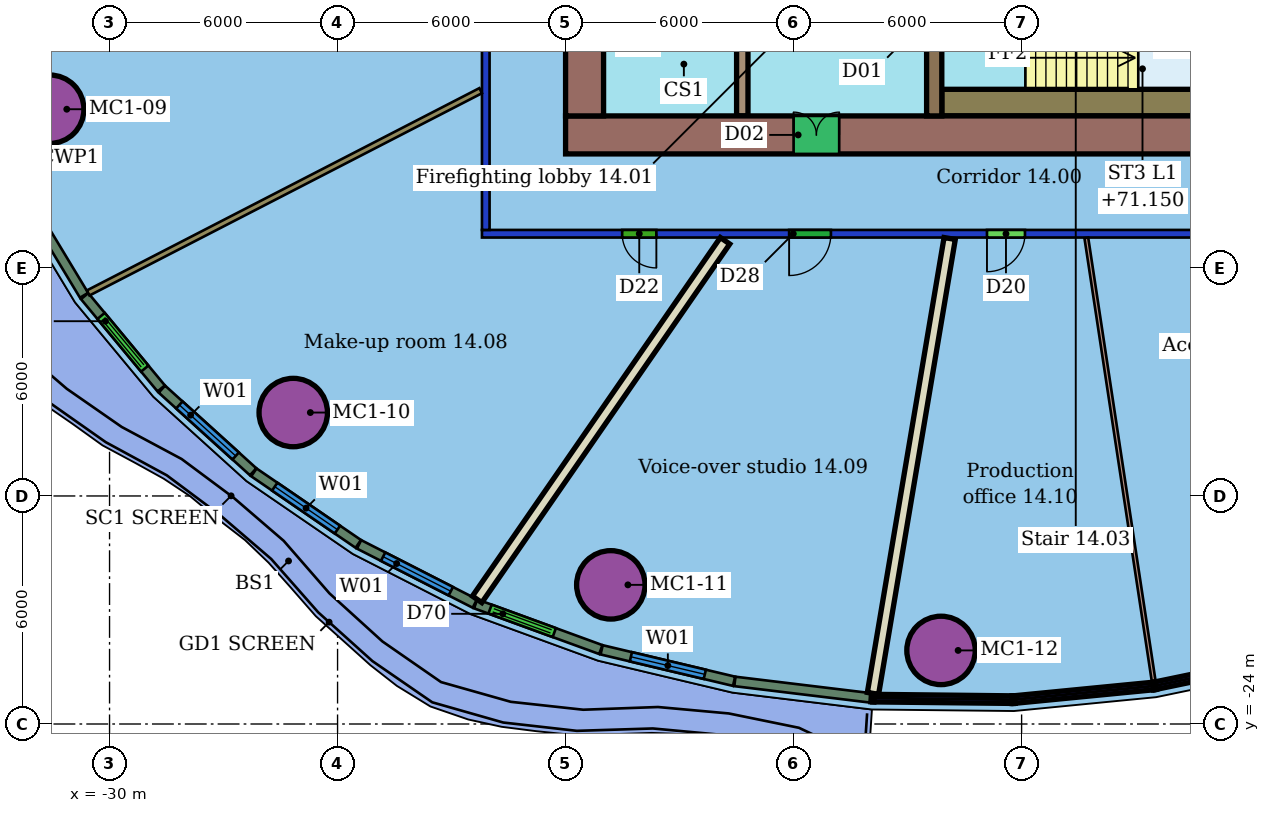
"""IFC4 building model, lengths in metres.
Left out: names, types, materials, properties, quantities, classifications, styles, units other than length and angle.
Written with IfcOpenShell. Run it as: python <this file> out.ifc"""

import sys

from ifc_helpers import new_model, si_unit, direction, frame, frame_2d, origin, origin_2d, place, context, subcontext, project, spatial, rectangle, hollow_circle, extrude, element, fill, save


model = new_model("IFC4")
c1 = context("Model", 3, precision=1e-05, world=origin(), true_north=direction((0.0, 1.0)))
c2 = subcontext(c1, "Body", "Model", "MODEL_VIEW")
j1 = project(units=[si_unit("LENGTHUNIT", "METRE"), si_unit("PLANEANGLEUNIT", "RADIAN")], contexts=[c1])
p1 = place(None, origin())
s1 = spatial("IfcSite", under=j1, at=p1, CompositionType="ELEMENT")
p2 = place(p1, origin())
s2 = spatial("IfcBuilding", under=s1, at=p2, CompositionType="ELEMENT")
p3 = place(p2, frame((0.0, 0.0, 69.3)))
s3 = spatial("IfcBuildingStorey", under=s2, at=p3, CompositionType="ELEMENT", Elevation=69.3)
for number, where, z_axis, x_axis in (
    (1, (-31.575, -7.824, 0.0), (0.0, 0.0, 1.0), (1.0, 0.0, 0.0)),
    (2, (-25.166, -15.805, 0.0), (0.0, 0.0, 1.0), (1.0, 0.0, 0.0)),
    (3, (-16.81, -20.339, 0.0), (0.0, 0.0, 1.0), (1.0, 0.0, 0.0)),
    (4, (-8.121, -22.064, 0.0), (0.0, 0.0, 1.0), (1.0, 0.0, 0.0)),
):
    element("IfcColumn", number, at=place(p3, frame(where, z_axis=z_axis, x_axis=x_axis)), inside=s3, PredefinedType="COLUMN", context=c2, shape_type="SweptSolid", body=[
        extrude(hollow_circle(Radius=0.9, WallThickness=0.06, at=origin_2d()), origin(), (0.0, 0.0, 1.0), 3.55),
    ])
p4 = place(p3, frame((8.2, -11.1, 0.0), z_axis=(0.0, 0.0, 1.0), x_axis=(-1.0, 0.0, 0.0)))
e5 = element("IfcWall", 5, at=p4, inside=s3, PredefinedType="PARTITIONING", context=c2, shape_type="SweptSolid", body=[
    extrude(rectangle(XDim=28.4, YDim=0.2, at=frame_2d((14.2, 0.0))), origin(), (0.0, 0.0, 1.0), 2.85),
])
p5 = place(p4, frame((23.811, 0.0, 0.0)))
e6 = element("IfcOpeningElement", 6, at=p5, cuts=e5, PredefinedType="OPENING", context=c2, shape_type="SweptSolid", body=[
    extrude(rectangle(XDim=0.9, YDim=2.1, at=frame_2d((0.45, 1.05))), frame((0.0, 0.11, 0.0), z_axis=(0.0, -1.0, 0.0), x_axis=(1.0, 0.0, 0.0)), (0.0, 0.0, 1.0), 0.22),
])
p6 = place(p4, frame((19.218, 0.0, 0.0)))
e7 = element("IfcOpeningElement", 7, at=p6, cuts=e5, PredefinedType="OPENING", context=c2, shape_type="SweptSolid", body=[
    extrude(rectangle(XDim=1.1, YDim=2.1, at=frame_2d((0.55, 1.05))), frame((0.0, 0.11, 0.0), z_axis=(0.0, -1.0, 0.0), x_axis=(1.0, 0.0, 0.0)), (0.0, 0.0, 1.0), 0.22),
])
p7 = place(p4, frame((14.111, 0.0, 0.0)))
e8 = element("IfcOpeningElement", 8, at=p7, cuts=e5, PredefinedType="OPENING", context=c2, shape_type="SweptSolid", body=[
    extrude(rectangle(XDim=1.0, YDim=2.1, at=frame_2d((0.5, 1.05))), frame((0.0, 0.11, 0.0), z_axis=(0.0, -1.0, 0.0), x_axis=(1.0, 0.0, 0.0)), (0.0, 0.0, 1.0), 0.22),
])
p8 = place(p4, frame((7.977, 0.0, 0.0)))
e9 = element("IfcOpeningElement", 9, at=p8, cuts=e5, PredefinedType="OPENING", context=c2, shape_type="SweptSolid", body=[
    extrude(rectangle(XDim=1.0, YDim=2.1, at=frame_2d((0.5, 1.05))), frame((0.0, 0.11, 0.0), z_axis=(0.0, -1.0, 0.0), x_axis=(1.0, 0.0, 0.0)), (0.0, 0.0, 1.0), 0.22),
])
p9 = place(p4, frame((3.287, 0.0, 0.0)))
e10 = element("IfcOpeningElement", 10, at=p9, cuts=e5, PredefinedType="OPENING", context=c2, shape_type="SweptSolid", body=[
    extrude(rectangle(XDim=1.2, YDim=2.1, at=frame_2d((0.6, 1.05))), frame((0.0, 0.11, 0.0), z_axis=(0.0, -1.0, 0.0), x_axis=(1.0, 0.0, 0.0)), (0.0, 0.0, 1.0), 0.22),
])
p10 = place(p3, frame((-20.1, -11.0, 0.0), z_axis=(0.0, 0.0, 1.0), x_axis=(0.0, 1.0, 0.0)))
e11 = element("IfcWall", 11, at=p10, inside=s3, PredefinedType="PARTITIONING", context=c2, shape_type="SweptSolid", body=[
    extrude(rectangle(XDim=22.0, YDim=0.2, at=frame_2d((11.0, 0.0))), origin(), (0.0, 0.0, 1.0), 2.85),
])
p11 = place(p10, frame((18.55, 0.0, 0.0)))
e12 = element("IfcOpeningElement", 12, at=p11, cuts=e11, PredefinedType="OPENING", context=c2, shape_type="SweptSolid", body=[
    extrude(rectangle(XDim=1.0, YDim=2.1, at=frame_2d((0.5, 1.05))), frame((0.0, 0.11, 0.0), z_axis=(0.0, -1.0, 0.0), x_axis=(1.0, 0.0, 0.0)), (0.0, 0.0, 1.0), 0.22),
])
p12 = place(p10, frame((14.132, 0.0, 0.0)))
e13 = element("IfcOpeningElement", 13, at=p12, cuts=e11, PredefinedType="OPENING", context=c2, shape_type="SweptSolid", body=[
    extrude(rectangle(XDim=1.1, YDim=2.1, at=frame_2d((0.55, 1.05))), frame((0.0, 0.11, 0.0), z_axis=(0.0, -1.0, 0.0), x_axis=(1.0, 0.0, 0.0)), (0.0, 0.0, 1.0), 0.22),
])
p13 = place(p10, frame((5.589, 0.0, 0.0)))
e14 = element("IfcOpeningElement", 14, at=p13, cuts=e11, PredefinedType="OPENING", context=c2, shape_type="SweptSolid", body=[
    extrude(rectangle(XDim=1.0, YDim=2.1, at=frame_2d((0.5, 1.05))), frame((0.0, 0.11, 0.0), z_axis=(0.0, -1.0, 0.0), x_axis=(1.0, 0.0, 0.0)), (0.0, 0.0, 1.0), 0.22),
])
p14 = place(p3, frame((-30.562, -12.658, 0.0), z_axis=(0.0, 0.0, 1.0), x_axis=(0.888901442765, 0.458098488375, 0.0)))
e15 = element("IfcWall", 15, at=p14, inside=s3, PredefinedType="PARTITIONING", context=c2, shape_type="SweptSolid", body=[
    extrude(rectangle(XDim=11.619, YDim=0.15, at=frame_2d((5.809, 0.0))), origin(), (0.0, 0.0, 1.0), 3.55),
])
p15 = place(p3, frame((-20.327, -20.72, 0.0), z_axis=(0.0, 0.0, 1.0), x_axis=(0.568736200027, 0.822519990504, 0.0)))
e16 = element("IfcWall", 16, at=p15, inside=s3, PredefinedType="PARTITIONING", context=c2, shape_type="SweptSolid", body=[
    extrude(rectangle(XDim=11.471, YDim=0.3, at=frame_2d((5.735, 0.0))), origin(), (0.0, 0.0, 1.0), 3.55),
])
p16 = place(p3, frame((-9.911, -23.194, 0.0), z_axis=(0.0, 0.0, 1.0), x_axis=(0.16625453359, 0.986082871802, 0.0)))
e17 = element("IfcWall", 17, at=p16, inside=s3, PredefinedType="PARTITIONING", context=c2, shape_type="SweptSolid", body=[
    extrude(rectangle(XDim=12.138, YDim=0.3, at=frame_2d((6.069, 0.0))), origin(), (0.0, 0.0, 1.0), 3.55),
])
p17 = place(p3, frame((-2.524, -22.874, 0.0), z_axis=(0.0, 0.0, 1.0), x_axis=(-0.150244181416, 0.988648919461, 0.0)))
e18 = element("IfcWall", 18, at=p17, inside=s3, PredefinedType="PARTITIONING", context=c2, shape_type="SweptSolid", body=[
    extrude(rectangle(XDim=11.801, YDim=0.1, at=frame_2d((5.9, 0.0))), origin(), (0.0, 0.0, 1.0), 3.55),
])
p18 = place(p3, frame((-32.246, -10.113, 0.0), z_axis=(0.0, 0.0, 1.0), x_axis=(0.517204963357, -0.855861569343, 0.0)))
e19 = element("IfcWall", 19, at=p18, inside=s3, PredefinedType="SOLIDWALL", context=c2, shape_type="SweptSolid", body=[
    extrude(rectangle(XDim=3.045, YDim=0.25, at=frame_2d((1.522, 0.0))), origin(), (0.0, 0.0, 1.0), 3.15),
])
p19 = place(p3, frame((-30.656, -12.741, 0.0), z_axis=(0.0, 0.0, 1.0), x_axis=(0.638501311246, -0.769620734867, 0.0)))
e20 = element("IfcWall", 20, at=p19, inside=s3, PredefinedType="SOLIDWALL", context=c2, shape_type="SweptSolid", body=[
    extrude(rectangle(XDim=3.156, YDim=0.25, at=frame_2d((1.578, 0.0))), origin(), (0.0, 0.0, 1.0), 3.15),
])
p20 = place(p19, frame((0.678, 0.0, 0.0)))
e21 = element("IfcOpeningElement", 21, at=p20, cuts=e20, PredefinedType="OPENING", context=c2, shape_type="SweptSolid", body=[
    extrude(rectangle(XDim=1.8, YDim=2.4, at=frame_2d((0.9, 1.2))), frame((0.0, 0.135, 0.0), z_axis=(0.0, -1.0, 0.0), x_axis=(1.0, 0.0, 0.0)), (0.0, 0.0, 1.0), 0.27),
])
p21 = place(p3, frame((-28.623, -15.189, 0.0), z_axis=(0.0, 0.0, 1.0), x_axis=(0.741210741085, -0.671272401712, 0.0)))
e22 = element("IfcWall", 22, at=p21, inside=s3, PredefinedType="SOLIDWALL", context=c2, shape_type="SweptSolid", body=[
    extrude(rectangle(XDim=3.24, YDim=0.25, at=frame_2d((1.62, 0.0))), origin(), (0.0, 0.0, 1.0), 3.15),
])
p22 = place(p21, frame((0.62, 0.0, 0.8)))
e23 = element("IfcOpeningElement", 23, at=p22, cuts=e22, PredefinedType="OPENING", context=c2, shape_type="SweptSolid", body=[
    extrude(rectangle(XDim=2.0, YDim=2.2, at=frame_2d((1.0, 1.1))), frame((0.0, 0.135, 0.0), z_axis=(0.0, -1.0, 0.0), x_axis=(1.0, 0.0, 0.0)), (0.0, 0.0, 1.0), 0.27),
])
p23 = place(p3, frame((-26.202, -17.379, 0.0), z_axis=(0.0, 0.0, 1.0), x_axis=(0.824956428259, -0.565196330026, 0.0)))
e24 = element("IfcWall", 24, at=p23, inside=s3, PredefinedType="SOLIDWALL", context=c2, shape_type="SweptSolid", body=[
    extrude(rectangle(XDim=3.33, YDim=0.25, at=frame_2d((1.665, 0.0))), origin(), (0.0, 0.0, 1.0), 3.15),
])
p24 = place(p23, frame((0.665, 0.0, 0.8)))
e25 = element("IfcOpeningElement", 25, at=p24, cuts=e24, PredefinedType="OPENING", context=c2, shape_type="SweptSolid", body=[
    extrude(rectangle(XDim=2.0, YDim=2.2, at=frame_2d((1.0, 1.1))), frame((0.0, 0.135, 0.0), z_axis=(0.0, -1.0, 0.0), x_axis=(1.0, 0.0, 0.0)), (0.0, 0.0, 1.0), 0.27),
])
p25 = place(p3, frame((-23.434, -19.273, 0.0), z_axis=(0.0, 0.0, 1.0), x_axis=(0.890540062844, -0.454904821331, 0.0)))
e26 = element("IfcWall", 26, at=p25, inside=s3, PredefinedType="SOLIDWALL", context=c2, shape_type="SweptSolid", body=[
    extrude(rectangle(XDim=3.421, YDim=0.25, at=frame_2d((1.71, 0.0))), origin(), (0.0, 0.0, 1.0), 3.15),
])
p26 = place(p25, frame((0.71, 0.0, 0.8)))
e27 = element("IfcOpeningElement", 27, at=p26, cuts=e26, PredefinedType="OPENING", context=c2, shape_type="SweptSolid", body=[
    extrude(rectangle(XDim=2.0, YDim=2.2, at=frame_2d((1.0, 1.1))), frame((0.0, 0.135, 0.0), z_axis=(0.0, -1.0, 0.0), x_axis=(1.0, 0.0, 0.0)), (0.0, 0.0, 1.0), 0.27),
])
p27 = place(p3, frame((-20.366, -20.839, 0.0), z_axis=(0.0, 0.0, 1.0), x_axis=(0.939349487408, -0.34296142714, 0.0)))
e28 = element("IfcWall", 28, at=p27, inside=s3, PredefinedType="SOLIDWALL", context=c2, shape_type="SweptSolid", body=[
    extrude(rectangle(XDim=3.507, YDim=0.25, at=frame_2d((1.753, 0.0))), origin(), (0.0, 0.0, 1.0), 3.15),
])
p28 = place(p27, frame((0.403, 0.0, 0.0)))
e29 = element("IfcOpeningElement", 29, at=p28, cuts=e28, PredefinedType="OPENING", context=c2, shape_type="SweptSolid", body=[
    extrude(rectangle(XDim=1.8, YDim=2.4, at=frame_2d((0.9, 1.2))), frame((0.0, 0.135, 0.0), z_axis=(0.0, -1.0, 0.0), x_axis=(1.0, 0.0, 0.0)), (0.0, 0.0, 1.0), 0.27),
])
p29 = place(p3, frame((-17.051, -22.048, 0.0), z_axis=(0.0, 0.0, 1.0), x_axis=(0.972918732783, -0.231147440823, 0.0)))
e30 = element("IfcWall", 30, at=p29, inside=s3, PredefinedType="SOLIDWALL", context=c2, shape_type="SweptSolid", body=[
    extrude(rectangle(XDim=3.582, YDim=0.25, at=frame_2d((1.791, 0.0))), origin(), (0.0, 0.0, 1.0), 3.15),
])
p30 = place(p29, frame((0.791, 0.0, 0.8)))
e31 = element("IfcOpeningElement", 31, at=p30, cuts=e30, PredefinedType="OPENING", context=c2, shape_type="SweptSolid", body=[
    extrude(rectangle(XDim=2.0, YDim=2.2, at=frame_2d((1.0, 1.1))), frame((0.0, 0.135, 0.0), z_axis=(0.0, -1.0, 0.0), x_axis=(1.0, 0.0, 0.0)), (0.0, 0.0, 1.0), 0.27),
])
p31 = place(p3, frame((-13.545, -22.88, 0.0), z_axis=(0.0, 0.0, 1.0), x_axis=(0.992750723447, -0.120191518405, 0.0)))
e32 = element("IfcWall", 32, at=p31, inside=s3, PredefinedType="SOLIDWALL", context=c2, shape_type="SweptSolid", body=[
    extrude(rectangle(XDim=3.597, YDim=0.25, at=frame_2d((1.799, 0.0))), origin(), (0.0, 0.0, 1.0), 3.15),
])
p32 = place(p3, frame((-18.0, -8.5, 0.0), z_axis=(0.0, 0.0, 1.0), x_axis=(1.0, 0.0, 0.0)))
e33 = element("IfcWall", 33, at=p32, inside=s3, PredefinedType="SHEAR", context=c2, shape_type="SweptSolid", body=[
    extrude(rectangle(XDim=24.0, YDim=1.0, at=frame_2d((12.0, 0.0))), origin(), (0.0, 0.0, 1.0), 3.4),
])
p33 = place(p32, frame((6.0, 0.0, 0.0)))
e34 = element("IfcOpeningElement", 34, at=p33, cuts=e33, PredefinedType="OPENING", context=c2, shape_type="SweptSolid", body=[
    extrude(rectangle(XDim=1.2, YDim=2.1, at=frame_2d((0.6, 1.05))), frame((0.0, 0.51, 0.0), z_axis=(0.0, -1.0, 0.0), x_axis=(1.0, 0.0, 0.0)), (0.0, 0.0, 1.0), 1.02),
])
p34 = place(p3, frame((-17.5, 8.0, 0.0), z_axis=(0.0, 0.0, 1.0), x_axis=(0.0, -1.0, 0.0)))
e35 = element("IfcWall", 35, at=p34, inside=s3, PredefinedType="SHEAR", context=c2, shape_type="SweptSolid", body=[
    extrude(rectangle(XDim=16.0, YDim=1.0, at=frame_2d((8.0, 0.0))), origin(), (0.0, 0.0, 1.0), 3.4),
])
p35 = place(p34, frame((11.9, 0.0, 0.0)))
e36 = element("IfcOpeningElement", 36, at=p35, cuts=e35, PredefinedType="OPENING", context=c2, shape_type="SweptSolid", body=[
    extrude(rectangle(XDim=1.2, YDim=2.1, at=frame_2d((0.6, 1.05))), frame((0.0, 0.51, 0.0), z_axis=(0.0, -1.0, 0.0), x_axis=(1.0, 0.0, 0.0)), (0.0, 0.0, 1.0), 1.02),
])
p36 = place(p34, frame((2.9, 0.0, 0.0)))
e37 = element("IfcOpeningElement", 37, at=p36, cuts=e35, PredefinedType="OPENING", context=c2, shape_type="SweptSolid", body=[
    extrude(rectangle(XDim=1.2, YDim=2.1, at=frame_2d((0.6, 1.05))), frame((0.0, 0.51, 0.0), z_axis=(0.0, -1.0, 0.0), x_axis=(1.0, 0.0, 0.0)), (0.0, 0.0, 1.0), 1.02),
])
p37 = place(p3, frame((-13.35, 8.0, 0.0), z_axis=(0.0, 0.0, 1.0), x_axis=(0.0, -1.0, 0.0)))
e38 = element("IfcWall", 38, at=p37, inside=s3, PredefinedType="SHEAR", context=c2, shape_type="SweptSolid", body=[
    extrude(rectangle(XDim=16.0, YDim=0.3, at=frame_2d((8.0, 0.0))), origin(), (0.0, 0.0, 1.0), 3.4),
])
p38 = place(p37, frame((7.25, 0.0, 0.0)))
e39 = element("IfcOpeningElement", 39, at=p38, cuts=e38, PredefinedType="OPENING", context=c2, shape_type="SweptSolid", body=[
    extrude(rectangle(XDim=1.5, YDim=2.1, at=frame_2d((0.75, 1.05))), frame((0.0, 0.16, 0.0), z_axis=(0.0, -1.0, 0.0), x_axis=(1.0, 0.0, 0.0)), (0.0, 0.0, 1.0), 0.32),
])
p39 = place(p3, frame((-8.3, -3.88, 0.0), z_axis=(0.0, 0.0, 1.0), x_axis=(0.0, -1.0, 0.0)))
e40 = element("IfcWall", 40, at=p39, inside=s3, PredefinedType="SHEAR", context=c2, shape_type="SweptSolid", body=[
    extrude(rectangle(XDim=4.12, YDim=0.4, at=frame_2d((2.06, 0.0))), origin(), (0.0, 0.0, 1.0), 3.4),
])
p40 = place(p39, frame((1.11, 0.0, 0.0)))
e41 = element("IfcOpeningElement", 41, at=p40, cuts=e40, PredefinedType="OPENING", context=c2, shape_type="SweptSolid", body=[
    extrude(rectangle(XDim=1.2, YDim=2.1, at=frame_2d((0.6, 1.05))), frame((0.0, 0.21, 0.0), z_axis=(0.0, -1.0, 0.0), x_axis=(1.0, 0.0, 0.0)), (0.0, 0.0, 1.0), 0.42),
])
p41 = place(p3, frame((-8.1, -7.65, 0.0), z_axis=(0.0, 0.0, 1.0), x_axis=(1.0, 0.0, 0.0)))
e42 = element("IfcWall", 42, at=p41, inside=s3, PredefinedType="SHEAR", context=c2, shape_type="SweptSolid", body=[
    extrude(rectangle(XDim=7.05, YDim=0.7, at=frame_2d((3.525, 0.0))), origin(), (0.0, 0.0, 1.0), 3.4),
])
p42 = place(p5, origin())
e43 = element("IfcDoor", 43, at=p42, inside=s3, OperationType="SINGLE_SWING_LEFT", PredefinedType="DOOR", context=c2, shape_type="SweptSolid", body=[
    extrude(rectangle(XDim=0.9, YDim=2.1, at=frame_2d((0.45, 1.05))), frame((0.0, 0.025, 0.0), z_axis=(0.0, -1.0, 0.0), x_axis=(1.0, 0.0, 0.0)), (0.0, 0.0, 1.0), 0.05),
])
fill(e6, e43)
p43 = place(p6, origin())
e44 = element("IfcDoor", 44, at=p43, inside=s3, OperationType="SINGLE_SWING_RIGHT", PredefinedType="DOOR", context=c2, shape_type="SweptSolid", body=[
    extrude(rectangle(XDim=1.1, YDim=2.1, at=frame_2d((0.55, 1.05))), frame((0.0, 0.025, 0.0), z_axis=(0.0, -1.0, 0.0), x_axis=(1.0, 0.0, 0.0)), (0.0, 0.0, 1.0), 0.05),
])
fill(e7, e44)
p44 = place(p7, origin())
e45 = element("IfcDoor", 45, at=p44, inside=s3, OperationType="SINGLE_SWING_RIGHT", PredefinedType="DOOR", context=c2, shape_type="SweptSolid", body=[
    extrude(rectangle(XDim=1.0, YDim=2.1, at=frame_2d((0.5, 1.05))), frame((0.0, 0.025, 0.0), z_axis=(0.0, -1.0, 0.0), x_axis=(1.0, 0.0, 0.0)), (0.0, 0.0, 1.0), 0.05),
])
fill(e8, e45)
p45 = place(p20, origin())
e46 = element("IfcDoor", 46, at=p45, inside=s3, OperationType="DOUBLE_DOOR_SLIDING", PredefinedType="DOOR", context=c2, shape_type="SweptSolid", body=[
    extrude(rectangle(XDim=1.8, YDim=2.4, at=frame_2d((0.9, 1.2))), frame((0.0, 0.025, 0.0), z_axis=(0.0, -1.0, 0.0), x_axis=(1.0, 0.0, 0.0)), (0.0, 0.0, 1.0), 0.05),
])
fill(e21, e46)
p46 = place(p22, origin())
e47 = element("IfcWindow", 47, at=p46, inside=s3, PartitioningType="SINGLE_PANEL", PredefinedType="WINDOW", context=c2, shape_type="SweptSolid", body=[
    extrude(rectangle(XDim=2.0, YDim=2.2, at=frame_2d((1.0, 1.1))), frame((0.0, 0.03, 0.0), z_axis=(0.0, -1.0, 0.0), x_axis=(1.0, 0.0, 0.0)), (0.0, 0.0, 1.0), 0.06),
])
fill(e23, e47)
p47 = place(p24, origin())
e48 = element("IfcWindow", 48, at=p47, inside=s3, PartitioningType="SINGLE_PANEL", PredefinedType="WINDOW", context=c2, shape_type="SweptSolid", body=[
    extrude(rectangle(XDim=2.0, YDim=2.2, at=frame_2d((1.0, 1.1))), frame((0.0, 0.03, 0.0), z_axis=(0.0, -1.0, 0.0), x_axis=(1.0, 0.0, 0.0)), (0.0, 0.0, 1.0), 0.06),
])
fill(e25, e48)
p48 = place(p26, origin())
e49 = element("IfcWindow", 49, at=p48, inside=s3, PartitioningType="SINGLE_PANEL", PredefinedType="WINDOW", context=c2, shape_type="SweptSolid", body=[
    extrude(rectangle(XDim=2.0, YDim=2.2, at=frame_2d((1.0, 1.1))), frame((0.0, 0.03, 0.0), z_axis=(0.0, -1.0, 0.0), x_axis=(1.0, 0.0, 0.0)), (0.0, 0.0, 1.0), 0.06),
])
fill(e27, e49)
p49 = place(p28, origin())
e50 = element("IfcDoor", 50, at=p49, inside=s3, OperationType="DOUBLE_DOOR_SLIDING", PredefinedType="DOOR", context=c2, shape_type="SweptSolid", body=[
    extrude(rectangle(XDim=1.8, YDim=2.4, at=frame_2d((0.9, 1.2))), frame((0.0, 0.025, 0.0), z_axis=(0.0, -1.0, 0.0), x_axis=(1.0, 0.0, 0.0)), (0.0, 0.0, 1.0), 0.05),
])
fill(e29, e50)
p50 = place(p30, origin())
e51 = element("IfcWindow", 51, at=p50, inside=s3, PartitioningType="SINGLE_PANEL", PredefinedType="WINDOW", context=c2, shape_type="SweptSolid", body=[
    extrude(rectangle(XDim=2.0, YDim=2.2, at=frame_2d((1.0, 1.1))), frame((0.0, 0.03, 0.0), z_axis=(0.0, -1.0, 0.0), x_axis=(1.0, 0.0, 0.0)), (0.0, 0.0, 1.0), 0.06),
])
fill(e31, e51)
p51 = place(p33, origin())
e52 = element("IfcDoor", 52, at=p51, inside=s3, OperationType="DOUBLE_DOOR_SINGLE_SWING", PredefinedType="NOTDEFINED", context=c2, shape_type="SweptSolid", body=[
    extrude(rectangle(XDim=1.2, YDim=2.1, at=frame_2d((0.6, 1.05))), frame((0.0, 0.025, 0.0), z_axis=(0.0, -1.0, 0.0), x_axis=(1.0, 0.0, 0.0)), (0.0, 0.0, 1.0), 0.05),
])
fill(e34, e52)
save(model, sys.argv[1])
